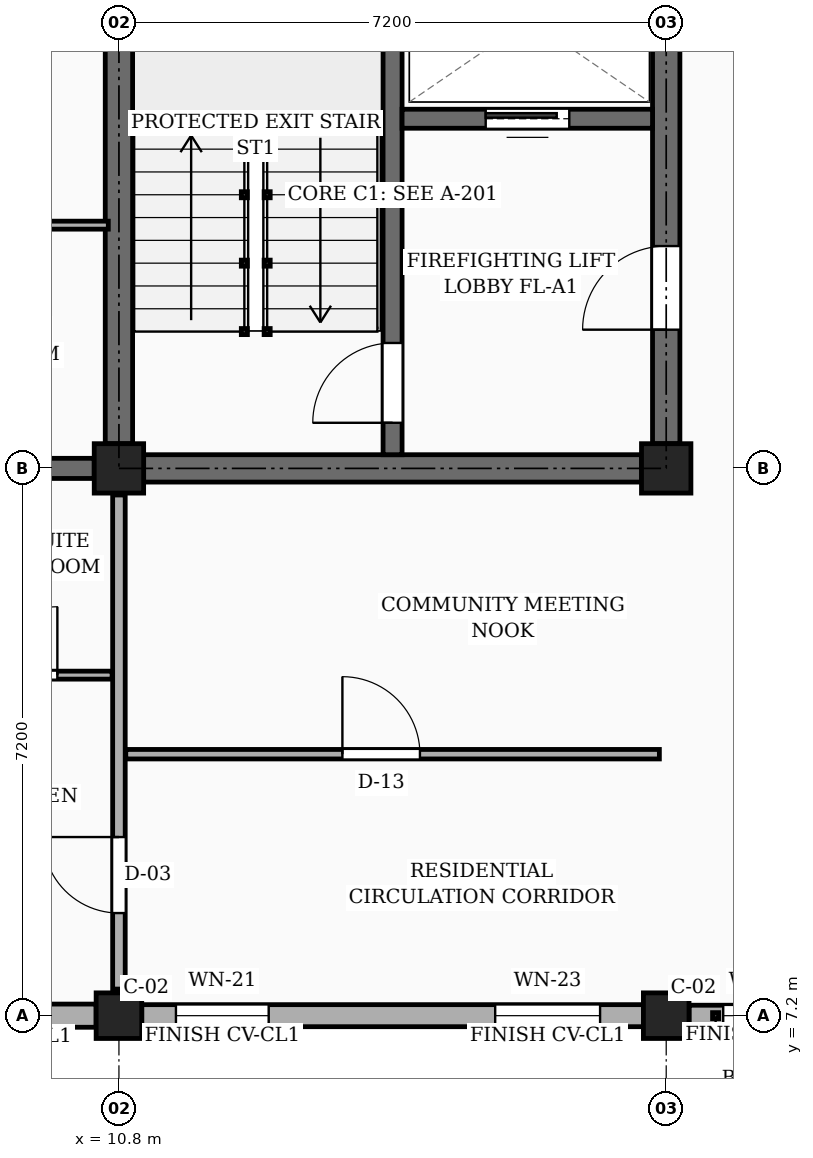
"""IFC4 building model, lengths in metres.
Left out: names, types, materials, properties, quantities, classifications, styles, units other than length and angle.
Written with IfcOpenShell. Run it as: python <this file> out.ifc"""

import sys

from ifc_helpers import new_model, si_unit, direction, frame, frame_2d, origin, origin_2d, place, context, subcontext, project, spatial, rectangle, extrude, element, fill, save


model = new_model("IFC4")
c1 = context("Model", 3, precision=1e-05, world=origin(), true_north=direction((0.0, 1.0)))
c2 = subcontext(c1, "Body", "Model", "MODEL_VIEW")
j1 = project(units=[si_unit("LENGTHUNIT", "METRE"), si_unit("PLANEANGLEUNIT", "RADIAN")], contexts=[c1])
p1 = place(None, origin())
s1 = spatial("IfcSite", under=j1, at=p1, CompositionType="ELEMENT")
p2 = place(p1, origin())
s2 = spatial("IfcBuilding", under=s1, at=p2, CompositionType="ELEMENT")
p3 = place(p2, frame((0.0, 0.0, 7.65)))
s3 = spatial("IfcBuildingStorey", under=s2, at=p3, CompositionType="ELEMENT", Elevation=7.65)
p4 = place(p3, frame((10.8, 7.2, 0.0), z_axis=(0.0, 0.0, 1.0), x_axis=(1.0, 0.0, 0.0)))
e1 = element("IfcColumn", 1, at=p4, inside=s3, PredefinedType="COLUMN", context=c2, shape_type="SweptSolid", body=[
    extrude(rectangle(XDim=0.6, YDim=0.6, at=origin_2d()), origin(), (0.0, 0.0, 1.0), 3.15),
])
p5 = place(p3, frame((10.8, 14.4, 0.0), z_axis=(0.0, 0.0, 1.0), x_axis=(1.0, 0.0, 0.0)))
e2 = element("IfcColumn", 2, at=p5, inside=s3, PredefinedType="COLUMN", context=c2, shape_type="SweptSolid", body=[
    extrude(rectangle(XDim=0.65, YDim=0.65, at=origin_2d()), origin(), (0.0, 0.0, 1.0), 3.15),
])
p6 = place(p3, frame((18.0, 7.2, 0.0), z_axis=(0.0, 0.0, 1.0), x_axis=(1.0, 0.0, 0.0)))
e3 = element("IfcColumn", 3, at=p6, inside=s3, PredefinedType="COLUMN", context=c2, shape_type="SweptSolid", body=[
    extrude(rectangle(XDim=0.6, YDim=0.6, at=origin_2d()), origin(), (0.0, 0.0, 1.0), 3.15),
])
p7 = place(p3, frame((18.0, 14.4, 0.0), z_axis=(0.0, 0.0, 1.0), x_axis=(1.0, 0.0, 0.0)))
e4 = element("IfcColumn", 4, at=p7, inside=s3, PredefinedType="COLUMN", context=c2, shape_type="SweptSolid", body=[
    extrude(rectangle(XDim=0.65, YDim=0.65, at=origin_2d()), origin(), (0.0, 0.0, 1.0), 3.15),
])
p8 = place(p3, frame((3.9, 14.4, 0.0), z_axis=(0.0, 0.0, 1.0), x_axis=(1.0, 0.0, 0.0)))
e5 = element("IfcWall", 5, at=p8, inside=s3, PredefinedType="SOLIDWALL", context=c2, shape_type="SweptSolid", body=[
    extrude(rectangle(XDim=6.575, YDim=0.265, at=frame_2d((3.288, 0.0))), origin(), (0.0, 0.0, 1.0), 2.17),
])
p9 = place(p8, frame((1.35, 0.0, 0.0)))
e6 = element("IfcOpeningElement", 6, at=p9, cuts=e5, PredefinedType="OPENING", context=c2, shape_type="SweptSolid", body=[
    extrude(rectangle(XDim=0.98, YDim=2.12, at=frame_2d((0.49, 1.06))), frame((0.0, 0.143, 0.0), z_axis=(0.0, -1.0, 0.0), x_axis=(1.0, 0.0, 0.0)), (0.0, 0.0, 1.0), 0.285),
])
p10 = place(p3, frame((3.9, 7.2, 0.0), z_axis=(0.0, 0.0, 1.0), x_axis=(1.0, 0.0, 0.0)))
e7 = element("IfcWall", 7, at=p10, inside=s3, PredefinedType="SOLIDWALL", context=c2, shape_type="SweptSolid", body=[
    extrude(rectangle(XDim=6.6, YDim=0.305, at=frame_2d((3.3, 0.0))), origin(), (0.0, 0.0, 1.0), 2.44),
])
p11 = place(p10, frame((0.45, 0.0, 0.78)))
e8 = element("IfcOpeningElement", 8, at=p11, cuts=e7, PredefinedType="OPENING", context=c2, shape_type="SweptSolid", body=[
    extrude(rectangle(XDim=1.06, YDim=1.36, at=frame_2d((0.53, 0.68))), frame((0.0, 0.163, 0.0), z_axis=(0.0, -1.0, 0.0), x_axis=(1.0, 0.0, 0.0)), (0.0, 0.0, 1.0), 0.325),
])
p12 = place(p10, frame((4.65, 0.0, 0.78)))
e9 = element("IfcOpeningElement", 9, at=p12, cuts=e7, PredefinedType="OPENING", context=c2, shape_type="SweptSolid", body=[
    extrude(rectangle(XDim=1.22, YDim=1.36, at=frame_2d((0.61, 0.68))), frame((0.0, 0.163, 0.0), z_axis=(0.0, -1.0, 0.0), x_axis=(1.0, 0.0, 0.0)), (0.0, 0.0, 1.0), 0.325),
])
p13 = place(p3, frame((11.1, 7.2, 0.0), z_axis=(0.0, 0.0, 1.0), x_axis=(1.0, 0.0, 0.0)))
e10 = element("IfcWall", 10, at=p13, inside=s3, PredefinedType="SOLIDWALL", context=c2, shape_type="SweptSolid", body=[
    extrude(rectangle(XDim=6.6, YDim=0.29, at=frame_2d((3.3, 0.0))), origin(), (0.0, 0.0, 1.0), 2.44),
])
p14 = place(p13, frame((0.45, 0.0, 0.78)))
e11 = element("IfcOpeningElement", 11, at=p14, cuts=e10, PredefinedType="OPENING", context=c2, shape_type="SweptSolid", body=[
    extrude(rectangle(XDim=1.22, YDim=1.36, at=frame_2d((0.61, 0.68))), frame((0.0, 0.155, 0.0), z_axis=(0.0, -1.0, 0.0), x_axis=(1.0, 0.0, 0.0)), (0.0, 0.0, 1.0), 0.31),
])
p15 = place(p13, frame((4.65, 0.0, 0.78)))
e12 = element("IfcOpeningElement", 12, at=p15, cuts=e10, PredefinedType="OPENING", context=c2, shape_type="SweptSolid", body=[
    extrude(rectangle(XDim=1.38, YDim=1.36, at=frame_2d((0.69, 0.68))), frame((0.0, 0.155, 0.0), z_axis=(0.0, -1.0, 0.0), x_axis=(1.0, 0.0, 0.0)), (0.0, 0.0, 1.0), 0.31),
])
p16 = place(p3, frame((18.3, 7.2, 0.0), z_axis=(0.0, 0.0, 1.0), x_axis=(1.0, 0.0, 0.0)))
e13 = element("IfcWall", 13, at=p16, inside=s3, PredefinedType="SOLIDWALL", context=c2, shape_type="SweptSolid", body=[
    extrude(rectangle(XDim=6.6, YDim=0.275, at=frame_2d((3.3, 0.0))), origin(), (0.0, 0.0, 1.0), 2.44),
])
p17 = place(p16, frame((0.45, 0.0, 0.78)))
e14 = element("IfcOpeningElement", 14, at=p17, cuts=e13, PredefinedType="OPENING", context=c2, shape_type="SweptSolid", body=[
    extrude(rectangle(XDim=1.04, YDim=1.26, at=frame_2d((0.52, 0.63))), frame((0.0, 0.147, 0.0), z_axis=(0.0, -1.0, 0.0), x_axis=(1.0, 0.0, 0.0)), (0.0, 0.0, 1.0), 0.295),
])
p18 = place(p16, frame((2.86, 0.0, 0.78)))
e15 = element("IfcOpeningElement", 15, at=p18, cuts=e13, PredefinedType="OPENING", context=c2, shape_type="SweptSolid", body=[
    extrude(rectangle(XDim=0.94, YDim=1.44, at=frame_2d((0.47, 0.72))), frame((0.0, 0.147, 0.0), z_axis=(0.0, -1.0, 0.0), x_axis=(1.0, 0.0, 0.0)), (0.0, 0.0, 1.0), 0.295),
])
p19 = place(p16, frame((5.14, 0.0, 0.78)))
e16 = element("IfcOpeningElement", 16, at=p19, cuts=e13, PredefinedType="OPENING", context=c2, shape_type="SweptSolid", body=[
    extrude(rectangle(XDim=1.04, YDim=1.26, at=frame_2d((0.52, 0.63))), frame((0.0, 0.147, 0.0), z_axis=(0.0, -1.0, 0.0), x_axis=(1.0, 0.0, 0.0)), (0.0, 0.0, 1.0), 0.295),
])
p20 = place(p3, frame((10.8, 14.725, 0.0), z_axis=(0.0, 0.0, 1.0), x_axis=(0.0, 1.0, 0.0)))
e17 = element("IfcWall", 17, at=p20, inside=s3, PredefinedType="SHEAR", context=c2, shape_type="SweptSolid", body=[
    extrude(rectangle(XDim=6.55, YDim=0.36, at=frame_2d((3.275, 0.0))), origin(), (0.0, 0.0, 1.0), 2.87),
])
p21 = place(p3, frame((18.0, 14.725, 0.0), z_axis=(0.0, 0.0, 1.0), x_axis=(0.0, 1.0, 0.0)))
e18 = element("IfcWall", 18, at=p21, inside=s3, PredefinedType="SHEAR", context=c2, shape_type="SweptSolid", body=[
    extrude(rectangle(XDim=6.55, YDim=0.36, at=frame_2d((3.275, 0.0))), origin(), (0.0, 0.0, 1.0), 2.87),
])
p22 = place(p21, frame((1.5, 0.0, 0.0)))
e19 = element("IfcOpeningElement", 19, at=p22, cuts=e18, PredefinedType="OPENING", context=c2, shape_type="SweptSolid", body=[
    extrude(rectangle(XDim=1.1, YDim=2.15, at=frame_2d((0.55, 1.075))), frame((0.0, 0.19, 0.0), z_axis=(0.0, -1.0, 0.0), x_axis=(1.0, 0.0, 0.0)), (0.0, 0.0, 1.0), 0.38),
])
p23 = place(p3, frame((11.125, 14.4, 0.0), z_axis=(0.0, 0.0, 1.0), x_axis=(1.0, 0.0, 0.0)))
e20 = element("IfcWall", 20, at=p23, inside=s3, PredefinedType="SHEAR", context=c2, shape_type="SweptSolid", body=[
    extrude(rectangle(XDim=6.55, YDim=0.36, at=frame_2d((3.275, 0.0))), origin(), (0.0, 0.0, 1.0), 2.87),
])
p24 = place(p3, frame((14.4, 14.58, 0.0), z_axis=(0.0, 0.0, 1.0), x_axis=(0.0, 1.0, 0.0)))
e21 = element("IfcWall", 21, at=p24, inside=s3, PredefinedType="SHEAR", context=c2, shape_type="SweptSolid", body=[
    extrude(rectangle(XDim=6.84, YDim=0.25, at=frame_2d((3.42, 0.0))), origin(), (0.0, 0.0, 1.0), 2.87),
])
p25 = place(p24, frame((0.42, 0.0, 0.0)))
e22 = element("IfcOpeningElement", 22, at=p25, cuts=e21, PredefinedType="OPENING", context=c2, shape_type="SweptSolid", body=[
    extrude(rectangle(XDim=1.05, YDim=2.15, at=frame_2d((0.525, 1.075))), frame((0.0, 0.135, 0.0), z_axis=(0.0, -1.0, 0.0), x_axis=(1.0, 0.0, 0.0)), (0.0, 0.0, 1.0), 0.27),
])
p26 = place(p3, frame((14.525, 19.0, 0.0), z_axis=(0.0, 0.0, 1.0), x_axis=(1.0, 0.0, 0.0)))
e23 = element("IfcWall", 23, at=p26, inside=s3, PredefinedType="SHEAR", context=c2, shape_type="SweptSolid", body=[
    extrude(rectangle(XDim=3.295, YDim=0.25, at=frame_2d((1.647, 0.0))), origin(), (0.0, 0.0, 1.0), 2.87),
])
p27 = place(p26, frame((1.1, 0.0, 0.0)))
e24 = element("IfcOpeningElement", 24, at=p27, cuts=e23, PredefinedType="OPENING", context=c2, shape_type="SweptSolid", body=[
    extrude(rectangle(XDim=1.1, YDim=2.2, at=frame_2d((0.55, 1.1))), frame((0.0, 0.135, 0.0), z_axis=(0.0, -1.0, 0.0), x_axis=(1.0, 0.0, 0.0)), (0.0, 0.0, 1.0), 0.27),
])
p28 = place(p3, frame((10.8, 7.55, 0.0), z_axis=(0.0, 0.0, 1.0), x_axis=(0.0, 1.0, 0.0)))
e25 = element("IfcWall", 25, at=p28, inside=s3, PredefinedType="PARTITIONING", context=c2, shape_type="SweptSolid", body=[
    extrude(rectangle(XDim=6.5, YDim=0.165, at=frame_2d((3.25, 0.0))), origin(), (0.0, 0.0, 1.0), 2.22),
])
p29 = place(p28, frame((1.0, 0.0, 0.0)))
e26 = element("IfcOpeningElement", 26, at=p29, cuts=e25, PredefinedType="OPENING", context=c2, shape_type="SweptSolid", body=[
    extrude(rectangle(XDim=1.0, YDim=2.15, at=frame_2d((0.5, 1.075))), frame((0.0, 0.093, 0.0), z_axis=(0.0, -1.0, 0.0), x_axis=(1.0, 0.0, 0.0)), (0.0, 0.0, 1.0), 0.185),
])
p30 = place(p3, frame((10.89, 10.64, 0.0), z_axis=(0.0, 0.0, 1.0), x_axis=(1.0, 0.0, 0.0)))
e27 = element("IfcWall", 27, at=p30, inside=s3, PredefinedType="PARTITIONING", context=c2, shape_type="SweptSolid", body=[
    extrude(rectangle(XDim=7.02, YDim=0.125, at=frame_2d((3.51, 0.0))), origin(), (0.0, 0.0, 1.0), 2.305),
])
p31 = place(p30, frame((2.85, 0.0, 0.0)))
e28 = element("IfcOpeningElement", 28, at=p31, cuts=e27, PredefinedType="OPENING", context=c2, shape_type="SweptSolid", body=[
    extrude(rectangle(XDim=1.02, YDim=2.15, at=frame_2d((0.51, 1.075))), frame((0.0, 0.073, 0.0), z_axis=(0.0, -1.0, 0.0), x_axis=(1.0, 0.0, 0.0)), (0.0, 0.0, 1.0), 0.145),
])
p32 = place(p3, frame((8.37, 11.68, 0.0), z_axis=(0.0, 0.0, 1.0), x_axis=(1.0, 0.0, 0.0)))
e29 = element("IfcWall", 29, at=p32, inside=s3, PredefinedType="PARTITIONING", context=c2, shape_type="SweptSolid", body=[
    extrude(rectangle(XDim=2.34, YDim=0.105, at=frame_2d((1.17, 0.0))), origin(), (0.0, 0.0, 1.0), 2.305),
])
p33 = place(p32, frame((0.72, 0.0, 0.0)))
e30 = element("IfcOpeningElement", 30, at=p33, cuts=e29, PredefinedType="OPENING", context=c2, shape_type="SweptSolid", body=[
    extrude(rectangle(XDim=0.9, YDim=2.05, at=frame_2d((0.45, 1.025))), frame((0.0, 0.062, 0.0), z_axis=(0.0, -1.0, 0.0), x_axis=(1.0, 0.0, 0.0)), (0.0, 0.0, 1.0), 0.125),
])
p34 = place(p3, frame((7.27, 17.6, 0.0), z_axis=(0.0, 0.0, 1.0), x_axis=(1.0, 0.0, 0.0)))
e31 = element("IfcWall", 31, at=p34, inside=s3, PredefinedType="PARTITIONING", context=c2, shape_type="SweptSolid", body=[
    extrude(rectangle(XDim=3.39, YDim=0.105, at=frame_2d((1.695, 0.0))), origin(), (0.0, 0.0, 1.0), 2.305),
])
p35 = place(p14, origin())
e32 = element("IfcWindow", 32, at=p35, inside=s3, PartitioningType="SINGLE_PANEL", PredefinedType="WINDOW", context=c2, shape_type="SweptSolid", body=[
    extrude(rectangle(XDim=1.22, YDim=1.36, at=frame_2d((0.61, 0.68))), frame((0.0, 0.03, 0.0), z_axis=(0.0, -1.0, 0.0), x_axis=(1.0, 0.0, 0.0)), (0.0, 0.0, 1.0), 0.06),
])
fill(e11, e32)
p36 = place(p15, origin())
e33 = element("IfcWindow", 33, at=p36, inside=s3, PartitioningType="SINGLE_PANEL", PredefinedType="WINDOW", context=c2, shape_type="SweptSolid", body=[
    extrude(rectangle(XDim=1.38, YDim=1.36, at=frame_2d((0.69, 0.68))), frame((0.0, 0.03, 0.0), z_axis=(0.0, -1.0, 0.0), x_axis=(1.0, 0.0, 0.0)), (0.0, 0.0, 1.0), 0.06),
])
fill(e12, e33)
p37 = place(p17, origin())
e34 = element("IfcWindow", 34, at=p37, inside=s3, PartitioningType="SINGLE_PANEL", PredefinedType="WINDOW", context=c2, shape_type="SweptSolid", body=[
    extrude(rectangle(XDim=1.04, YDim=1.26, at=frame_2d((0.52, 0.63))), frame((0.0, 0.03, 0.0), z_axis=(0.0, -1.0, 0.0), x_axis=(1.0, 0.0, 0.0)), (0.0, 0.0, 1.0), 0.06),
])
fill(e14, e34)
p38 = place(p22, frame((1.1, 0.0, 0.0), z_axis=(0.0, 0.0, 1.0), x_axis=(-1.0, 0.0, 0.0)))
e35 = element("IfcDoor", 35, at=p38, inside=s3, OperationType="SINGLE_SWING_LEFT", PredefinedType="DOOR", context=c2, shape_type="SweptSolid", body=[
    extrude(rectangle(XDim=1.1, YDim=2.15, at=frame_2d((0.55, 1.075))), frame((0.0, 0.025, 0.0), z_axis=(0.0, -1.0, 0.0), x_axis=(1.0, 0.0, 0.0)), (0.0, 0.0, 1.0), 0.05),
])
fill(e19, e35)
p39 = place(p25, origin())
e36 = element("IfcDoor", 36, at=p39, inside=s3, OperationType="SINGLE_SWING_LEFT", PredefinedType="DOOR", context=c2, shape_type="SweptSolid", body=[
    extrude(rectangle(XDim=1.05, YDim=2.15, at=frame_2d((0.525, 1.075))), frame((0.0, 0.025, 0.0), z_axis=(0.0, -1.0, 0.0), x_axis=(1.0, 0.0, 0.0)), (0.0, 0.0, 1.0), 0.05),
])
fill(e22, e36)
p40 = place(p27, origin())
e37 = element("IfcDoor", 37, at=p40, inside=s3, OperationType="SLIDING_TO_LEFT", PredefinedType="DOOR", context=c2, shape_type="SweptSolid", body=[
    extrude(rectangle(XDim=1.1, YDim=2.2, at=frame_2d((0.55, 1.1))), frame((0.0, 0.025, 0.0), z_axis=(0.0, -1.0, 0.0), x_axis=(1.0, 0.0, 0.0)), (0.0, 0.0, 1.0), 0.05),
])
fill(e24, e37)
p41 = place(p29, origin())
e38 = element("IfcDoor", 38, at=p41, inside=s3, OperationType="SINGLE_SWING_RIGHT", PredefinedType="DOOR", context=c2, shape_type="SweptSolid", body=[
    extrude(rectangle(XDim=1.0, YDim=2.15, at=frame_2d((0.5, 1.075))), frame((0.0, 0.025, 0.0), z_axis=(0.0, -1.0, 0.0), x_axis=(1.0, 0.0, 0.0)), (0.0, 0.0, 1.0), 0.05),
])
fill(e26, e38)
p42 = place(p31, origin())
e39 = element("IfcDoor", 39, at=p42, inside=s3, OperationType="SINGLE_SWING_LEFT", PredefinedType="DOOR", context=c2, shape_type="SweptSolid", body=[
    extrude(rectangle(XDim=1.02, YDim=2.15, at=frame_2d((0.51, 1.075))), frame((0.0, 0.025, 0.0), z_axis=(0.0, -1.0, 0.0), x_axis=(1.0, 0.0, 0.0)), (0.0, 0.0, 1.0), 0.05),
])
fill(e28, e39)
p43 = place(p33, origin())
e40 = element("IfcDoor", 40, at=p43, inside=s3, OperationType="SINGLE_SWING_RIGHT", PredefinedType="DOOR", context=c2, shape_type="SweptSolid", body=[
    extrude(rectangle(XDim=0.9, YDim=2.05, at=frame_2d((0.45, 1.025))), frame((0.0, 0.025, 0.0), z_axis=(0.0, -1.0, 0.0), x_axis=(1.0, 0.0, 0.0)), (0.0, 0.0, 1.0), 0.05),
])
fill(e30, e40)
save(model, sys.argv[1])
